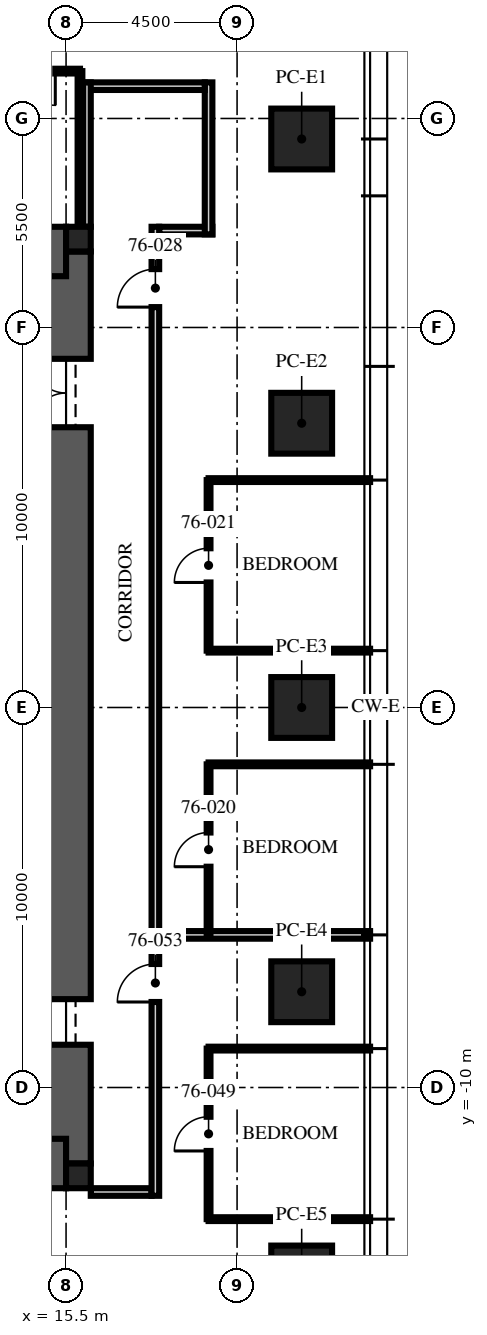
"""IFC4 building model, lengths in metres.
Left out: names, types, materials, properties, quantities, classifications, styles, units other than length and angle.
Written with IfcOpenShell. Run it as: python <this file> out.ifc"""

import sys

from ifc_helpers import new_model, si_unit, direction, frame, frame_2d, origin, origin_2d, place, context, subcontext, project, spatial, rectangle, extrude, element, fill, save


model = new_model("IFC4")
c1 = context("Model", 3, precision=1e-05, world=origin(), true_north=direction((0.0, 1.0)))
c2 = subcontext(c1, "Body", "Model", "MODEL_VIEW")
j1 = project(units=[si_unit("LENGTHUNIT", "METRE"), si_unit("PLANEANGLEUNIT", "RADIAN")], contexts=[c1])
p1 = place(None, origin())
s1 = spatial("IfcSite", under=j1, at=p1, CompositionType="ELEMENT")
p2 = place(p1, origin())
s2 = spatial("IfcBuilding", under=s1, at=p2, CompositionType="ELEMENT")
p3 = place(p2, frame((0.0, 0.0, 304.5)))
s3 = spatial("IfcBuildingStorey", under=s2, at=p3, CompositionType="ELEMENT", Elevation=304.5)
p4 = place(p3, frame((15.5, -12.0, -0.25), z_axis=(0.0, 0.0, 1.0), x_axis=(0.0, 1.0, 0.0)))
e1 = element("IfcWall", 1, at=p4, inside=s3, PredefinedType="SHEAR", context=c2, shape_type="SweptSolid", body=[
    extrude(rectangle(XDim=24.0, YDim=1.3, at=frame_2d((12.0, 0.0))), origin(), (0.0, 0.0, 1.0), 3.75),
])
p5 = place(p4, frame((3.125, 0.0, 0.25)))
e2 = element("IfcOpeningElement", 2, at=p5, cuts=e1, PredefinedType="OPENING", context=c2, shape_type="SweptSolid", body=[
    extrude(rectangle(XDim=1.2, YDim=2.1, at=frame_2d((0.6, 1.05))), frame((0.0, 0.66, 0.0), z_axis=(0.0, -1.0, 0.0), x_axis=(1.0, 0.0, 0.0)), (0.0, 0.0, 1.0), 1.32),
])
p6 = place(p4, frame((19.375, 0.0, 0.25)))
e3 = element("IfcOpeningElement", 3, at=p6, cuts=e1, PredefinedType="OPENING", context=c2, shape_type="SweptSolid", body=[
    extrude(rectangle(XDim=1.8, YDim=2.1, at=frame_2d((0.9, 1.05))), frame((0.0, 0.66, 0.0), z_axis=(0.0, -1.0, 0.0), x_axis=(1.0, 0.0, 0.0)), (0.0, 0.0, 1.0), 1.32),
])
for number, where, z_axis, x_axis in (
    (4, (-15.5, 12.0, -0.25), (0.0, 0.0, 1.0), (1.0, 0.0, 0.0)),
    (5, (-15.5, -12.0, -0.25), (0.0, 0.0, 1.0), (1.0, 0.0, 0.0)),
):
    element("IfcWall", number, at=place(p3, frame(where, z_axis=z_axis, x_axis=x_axis)), inside=s3, PredefinedType="SHEAR", context=c2, shape_type="SweptSolid", body=[
        extrude(rectangle(XDim=31.0, YDim=1.3, at=frame_2d((15.5, 0.0))), origin(), (0.0, 0.0, 1.0), 3.75),
    ])
for number, where, z_axis, x_axis in (
    (6, (15.825, 12.325, -0.25), (0.0, 0.0, 1.0), (1.0, 0.0, 0.0)),
    (7, (15.825, -12.325, -0.25), (0.0, 0.0, 1.0), (1.0, 0.0, 0.0)),
):
    element("IfcColumn", number, at=place(p3, frame(where, z_axis=z_axis, x_axis=x_axis)), inside=s3, PredefinedType="COLUMN", context=c2, shape_type="SweptSolid", body=[
        extrude(rectangle(XDim=0.65, YDim=0.65, at=origin_2d()), origin(), (0.0, 0.0, 1.0), 3.75),
    ])
for number, where, z_axis, x_axis in (
    (8, (21.7, 14.96, 0.0), (0.0, 0.0, 1.0), (0.0, 1.0, 0.0)),
    (9, (21.7, 7.48, 0.0), (0.0, 0.0, 1.0), (0.0, 1.0, 0.0)),
    (10, (21.7, 0.0, 0.0), (0.0, 0.0, 1.0), (0.0, 1.0, 0.0)),
    (11, (21.7, -7.48, 0.0), (0.0, 0.0, 1.0), (0.0, 1.0, 0.0)),
    (12, (21.7, -14.96, 0.0), (0.0, 0.0, 1.0), (0.0, 1.0, 0.0)),
):
    element("IfcColumn", number, at=place(p3, frame(where, z_axis=z_axis, x_axis=x_axis)), inside=s3, PredefinedType="COLUMN", context=c2, shape_type="SweptSolid", body=[
        extrude(rectangle(XDim=1.6, YDim=1.6, at=origin_2d()), origin(), (0.0, 0.0, 1.0), 3.75),
    ])
p7 = place(p3, frame((17.95, 12.55, 0.0), z_axis=(0.0, 0.0, 1.0), x_axis=(1.0, 0.0, 0.0)))
e13 = element("IfcWall", 13, at=p7, inside=s3, PredefinedType="PARTITIONING", context=c2, shape_type="SweptSolid", body=[
    extrude(rectangle(XDim=1.4, YDim=0.2, at=frame_2d((0.7, 0.0))), origin(), (0.0, 0.0, 1.0), 3.5),
])
p8 = place(p3, frame((19.25, 12.45, 0.0), z_axis=(0.0, 0.0, 1.0), x_axis=(0.0, 1.0, 0.0)))
e14 = element("IfcWall", 14, at=p8, inside=s3, PredefinedType="PARTITIONING", context=c2, shape_type="SweptSolid", body=[
    extrude(rectangle(XDim=4.0, YDim=0.2, at=frame_2d((2.0, 0.0))), origin(), (0.0, 0.0, 1.0), 2.9),
])
p9 = place(p3, frame((19.15, 16.35, 0.0), z_axis=(0.0, 0.0, 1.0), x_axis=(-1.0, 0.0, 0.0)))
e15 = element("IfcWall", 15, at=p9, inside=s3, PredefinedType="PARTITIONING", context=c2, shape_type="SweptSolid", body=[
    extrude(rectangle(XDim=3.2, YDim=0.2, at=frame_2d((1.6, 0.0))), origin(), (0.0, 0.0, 1.0), 2.6),
])
p10 = place(p3, frame((16.05, 16.45, 0.0), z_axis=(0.0, 0.0, 1.0), x_axis=(0.0, -1.0, 0.0)))
e16 = element("IfcWall", 16, at=p10, inside=s3, PredefinedType="PARTITIONING", context=c2, shape_type="SweptSolid", body=[
    extrude(rectangle(XDim=3.8, YDim=0.2, at=frame_2d((1.9, 0.0))), origin(), (0.0, 0.0, 1.0), 2.6),
])
p11 = place(p3, frame((16.15, -12.75, 0.0), z_axis=(0.0, 0.0, 1.0), x_axis=(1.0, 0.0, 0.0)))
e17 = element("IfcWall", 17, at=p11, inside=s3, PredefinedType="PARTITIONING", context=c2, shape_type="SweptSolid", body=[
    extrude(rectangle(XDim=1.6, YDim=0.2, at=frame_2d((0.8, 0.0))), origin(), (0.0, 0.0, 1.0), 2.6),
])
p12 = place(p3, frame((17.95, -5.984, 0.0), z_axis=(0.0, 0.0, 1.0), x_axis=(1.0, 0.0, 0.0)))
e18 = element("IfcWall", 18, at=p12, inside=s3, PredefinedType="PARTITIONING", context=c2, shape_type="SweptSolid", body=[
    extrude(rectangle(XDim=5.55, YDim=0.2, at=frame_2d((2.775, 0.0))), origin(), (0.0, 0.0, 1.0), 3.01),
])
for number, where, z_axis, x_axis in (
    (19, (19.25, -1.496, 0.0), (0.0, 0.0, 1.0), (1.0, 0.0, 0.0)),
    (20, (19.25, 1.496, 0.0), (0.0, 0.0, 1.0), (1.0, 0.0, 0.0)),
    (21, (19.25, 5.984, 0.0), (0.0, 0.0, 1.0), (1.0, 0.0, 0.0)),
    (22, (19.25, -13.464, 0.0), (0.0, 0.0, 1.0), (1.0, 0.0, 0.0)),
    (23, (19.25, -8.976, 0.0), (0.0, 0.0, 1.0), (1.0, 0.0, 0.0)),
):
    element("IfcWall", number, at=place(p3, frame(where, z_axis=z_axis, x_axis=x_axis)), inside=s3, PredefinedType="PARTITIONING", context=c2, shape_type="SweptSolid", body=[
        extrude(rectangle(XDim=4.25, YDim=0.1, at=frame_2d((2.125, 0.0))), origin(), (0.0, 0.0, 1.0), 3.01),
    ])
p13 = place(p3, frame((19.25, -5.984, 0.0), z_axis=(0.0, 0.0, 1.0), x_axis=(0.0, 1.0, 0.0)))
e24 = element("IfcWall", 24, at=p13, inside=s3, PredefinedType="PARTITIONING", context=c2, shape_type="SweptSolid", body=[
    extrude(rectangle(XDim=4.488, YDim=0.1, at=frame_2d((2.244, 0.0))), origin(), (0.0, 0.0, 1.0), 2.91),
])
p14 = place(p13, frame((1.794, 0.0, 0.0)))
e25 = element("IfcOpeningElement", 25, at=p14, cuts=e24, PredefinedType="OPENING", context=c2, shape_type="SweptSolid", body=[
    extrude(rectangle(XDim=0.9, YDim=2.1, at=frame_2d((0.45, 1.05))), frame((0.0, 0.06, 0.0), z_axis=(0.0, -1.0, 0.0), x_axis=(1.0, 0.0, 0.0)), (0.0, 0.0, 1.0), 0.12),
])
p15 = place(p3, frame((19.25, 1.496, 0.0), z_axis=(0.0, 0.0, 1.0), x_axis=(0.0, 1.0, 0.0)))
e26 = element("IfcWall", 26, at=p15, inside=s3, PredefinedType="PARTITIONING", context=c2, shape_type="SweptSolid", body=[
    extrude(rectangle(XDim=4.488, YDim=0.1, at=frame_2d((2.244, 0.0))), origin(), (0.0, 0.0, 1.0), 2.91),
])
p16 = place(p15, frame((1.794, 0.0, 0.0)))
e27 = element("IfcOpeningElement", 27, at=p16, cuts=e26, PredefinedType="OPENING", context=c2, shape_type="SweptSolid", body=[
    extrude(rectangle(XDim=0.9, YDim=2.1, at=frame_2d((0.45, 1.05))), frame((0.0, 0.06, 0.0), z_axis=(0.0, -1.0, 0.0), x_axis=(1.0, 0.0, 0.0)), (0.0, 0.0, 1.0), 0.12),
])
p17 = place(p3, frame((15.866, 16.746, 0.0), z_axis=(0.0, 0.0, 1.0), x_axis=(-1.0, 0.0, 0.0)))
e28 = element("IfcWall", 28, at=p17, inside=s3, PredefinedType="PARTITIONING", context=c2, shape_type="SweptSolid", body=[
    extrude(rectangle(XDim=6.2, YDim=0.125, at=frame_2d((3.1, 0.0))), origin(), (0.0, 0.0, 1.0), 2.9),
])
p18 = place(p17, frame((0.65, 0.0, 0.0)))
e29 = element("IfcOpeningElement", 29, at=p18, cuts=e28, PredefinedType="OPENING", context=c2, shape_type="SweptSolid", body=[
    extrude(rectangle(XDim=0.9, YDim=2.1, at=frame_2d((0.45, 1.05))), frame((0.0, 0.073, 0.0), z_axis=(0.0, -1.0, 0.0), x_axis=(1.0, 0.0, 0.0)), (0.0, 0.0, 1.0), 0.145),
])
p19 = place(p17, frame((2.85, 0.0, 0.0)))
e30 = element("IfcOpeningElement", 30, at=p19, cuts=e28, PredefinedType="OPENING", context=c2, shape_type="SweptSolid", body=[
    extrude(rectangle(XDim=0.9, YDim=2.1, at=frame_2d((0.45, 1.05))), frame((0.0, 0.073, 0.0), z_axis=(0.0, -1.0, 0.0), x_axis=(1.0, 0.0, 0.0)), (0.0, 0.0, 1.0), 0.145),
])
p20 = place(p17, frame((4.85, 0.0, 0.0)))
e31 = element("IfcOpeningElement", 31, at=p20, cuts=e28, PredefinedType="OPENING", context=c2, shape_type="SweptSolid", body=[
    extrude(rectangle(XDim=0.9, YDim=2.1, at=frame_2d((0.45, 1.05))), frame((0.0, 0.073, 0.0), z_axis=(0.0, -1.0, 0.0), x_axis=(1.0, 0.0, 0.0)), (0.0, 0.0, 1.0), 0.145),
])
p21 = place(p3, frame((15.866, 12.65, 0.0), z_axis=(0.0, 0.0, 1.0), x_axis=(0.0, 1.0, 0.0)))
e32 = element("IfcWall", 32, at=p21, inside=s3, PredefinedType="PARTITIONING", context=c2, shape_type="SweptSolid", body=[
    extrude(rectangle(XDim=4.096, YDim=0.125, at=frame_2d((2.048, 0.0))), origin(), (0.0, 0.0, 1.0), 2.6),
])
p22 = place(p3, frame((19.25, -13.464, 0.0), z_axis=(0.0, 0.0, 1.0), x_axis=(0.0, 1.0, 0.0)))
e33 = element("IfcWall", 33, at=p22, inside=s3, PredefinedType="PARTITIONING", context=c2, shape_type="SweptSolid", body=[
    extrude(rectangle(XDim=4.488, YDim=0.1, at=frame_2d((2.244, 0.0))), origin(), (0.0, 0.0, 1.0), 2.91),
])
p23 = place(p22, frame((1.794, 0.0, 0.0)))
e34 = element("IfcOpeningElement", 34, at=p23, cuts=e33, PredefinedType="OPENING", context=c2, shape_type="SweptSolid", body=[
    extrude(rectangle(XDim=0.9, YDim=2.1, at=frame_2d((0.45, 1.05))), frame((0.0, 0.06, 0.0), z_axis=(0.0, -1.0, 0.0), x_axis=(1.0, 0.0, 0.0)), (0.0, 0.0, 1.0), 0.12),
])
p24 = place(p3, frame((17.85, -12.85, 0.0), z_axis=(0.0, 0.0, 1.0), x_axis=(0.0, 1.0, 0.0)))
e35 = element("IfcWall", 35, at=p24, inside=s3, PredefinedType="PARTITIONING", context=c2, shape_type="SweptSolid", body=[
    extrude(rectangle(XDim=25.5, YDim=0.2, at=frame_2d((12.75, 0.0))), origin(), (0.0, 0.0, 1.0), 2.9),
])
p25 = place(p24, frame((23.386, 0.0, 0.0)))
e36 = element("IfcOpeningElement", 36, at=p25, cuts=e35, PredefinedType="OPENING", context=c2, shape_type="SweptSolid", body=[
    extrude(rectangle(XDim=1.0, YDim=2.2, at=frame_2d((0.5, 1.1))), frame((0.0, 0.11, 0.0), z_axis=(0.0, -1.0, 0.0), x_axis=(1.0, 0.0, 0.0)), (0.0, 0.0, 1.0), 0.22),
])
p26 = place(p24, frame((5.1, 0.0, 0.0)))
e37 = element("IfcOpeningElement", 37, at=p26, cuts=e35, PredefinedType="OPENING", context=c2, shape_type="SweptSolid", body=[
    extrude(rectangle(XDim=1.0, YDim=2.2, at=frame_2d((0.5, 1.1))), frame((0.0, 0.11, 0.0), z_axis=(0.0, -1.0, 0.0), x_axis=(1.0, 0.0, 0.0)), (0.0, 0.0, 1.0), 0.22),
])
p27 = place(p5, origin())
e38 = element("IfcDoor", 38, at=p27, inside=s3, OperationType="SINGLE_SWING_LEFT", PredefinedType="DOOR", context=c2, shape_type="SweptSolid", body=[
    extrude(rectangle(XDim=1.2, YDim=2.1, at=frame_2d((0.6, 1.05))), frame((0.0, 0.025, 0.0), z_axis=(0.0, -1.0, 0.0), x_axis=(1.0, 0.0, 0.0)), (0.0, 0.0, 1.0), 0.05),
])
fill(e2, e38)
p28 = place(p6, origin())
e39 = element("IfcDoor", 39, at=p28, inside=s3, OperationType="DOUBLE_DOOR_SINGLE_SWING", PredefinedType="DOOR", context=c2, shape_type="SweptSolid", body=[
    extrude(rectangle(XDim=1.8, YDim=2.1, at=frame_2d((0.9, 1.05))), frame((0.0, 0.025, 0.0), z_axis=(0.0, -1.0, 0.0), x_axis=(1.0, 0.0, 0.0)), (0.0, 0.0, 1.0), 0.05),
])
fill(e3, e39)
p29 = place(p14, origin())
e40 = element("IfcDoor", 40, at=p29, inside=s3, OperationType="SINGLE_SWING_LEFT", PredefinedType="DOOR", context=c2, shape_type="SweptSolid", body=[
    extrude(rectangle(XDim=0.9, YDim=2.1, at=frame_2d((0.45, 1.05))), frame((0.0, 0.025, 0.0), z_axis=(0.0, -1.0, 0.0), x_axis=(1.0, 0.0, 0.0)), (0.0, 0.0, 1.0), 0.05),
])
fill(e25, e40)
p30 = place(p16, origin())
e41 = element("IfcDoor", 41, at=p30, inside=s3, OperationType="SINGLE_SWING_LEFT", PredefinedType="DOOR", context=c2, shape_type="SweptSolid", body=[
    extrude(rectangle(XDim=0.9, YDim=2.1, at=frame_2d((0.45, 1.05))), frame((0.0, 0.025, 0.0), z_axis=(0.0, -1.0, 0.0), x_axis=(1.0, 0.0, 0.0)), (0.0, 0.0, 1.0), 0.05),
])
fill(e27, e41)
p31 = place(p18, origin())
e42 = element("IfcDoor", 42, at=p31, inside=s3, OperationType="SINGLE_SWING_LEFT", PredefinedType="DOOR", context=c2, shape_type="SweptSolid", body=[
    extrude(rectangle(XDim=0.9, YDim=2.1, at=frame_2d((0.45, 1.05))), frame((0.0, 0.025, 0.0), z_axis=(0.0, -1.0, 0.0), x_axis=(1.0, 0.0, 0.0)), (0.0, 0.0, 1.0), 0.05),
])
fill(e29, e42)
p32 = place(p25, origin())
e43 = element("IfcDoor", 43, at=p32, inside=s3, OperationType="SINGLE_SWING_LEFT", PredefinedType="DOOR", context=c2, shape_type="SweptSolid", body=[
    extrude(rectangle(XDim=1.0, YDim=2.2, at=frame_2d((0.5, 1.1))), frame((0.0, 0.025, 0.0), z_axis=(0.0, -1.0, 0.0), x_axis=(1.0, 0.0, 0.0)), (0.0, 0.0, 1.0), 0.05),
])
fill(e36, e43)
p33 = place(p23, origin())
e44 = element("IfcDoor", 44, at=p33, inside=s3, OperationType="SINGLE_SWING_LEFT", PredefinedType="DOOR", context=c2, shape_type="SweptSolid", body=[
    extrude(rectangle(XDim=0.9, YDim=2.1, at=frame_2d((0.45, 1.05))), frame((0.0, 0.025, 0.0), z_axis=(0.0, -1.0, 0.0), x_axis=(1.0, 0.0, 0.0)), (0.0, 0.0, 1.0), 0.05),
])
fill(e34, e44)
p34 = place(p26, origin())
e45 = element("IfcDoor", 45, at=p34, inside=s3, OperationType="SINGLE_SWING_LEFT", PredefinedType="DOOR", context=c2, shape_type="SweptSolid", body=[
    extrude(rectangle(XDim=1.0, YDim=2.2, at=frame_2d((0.5, 1.1))), frame((0.0, 0.025, 0.0), z_axis=(0.0, -1.0, 0.0), x_axis=(1.0, 0.0, 0.0)), (0.0, 0.0, 1.0), 0.05),
])
fill(e37, e45)
save(model, sys.argv[1])
